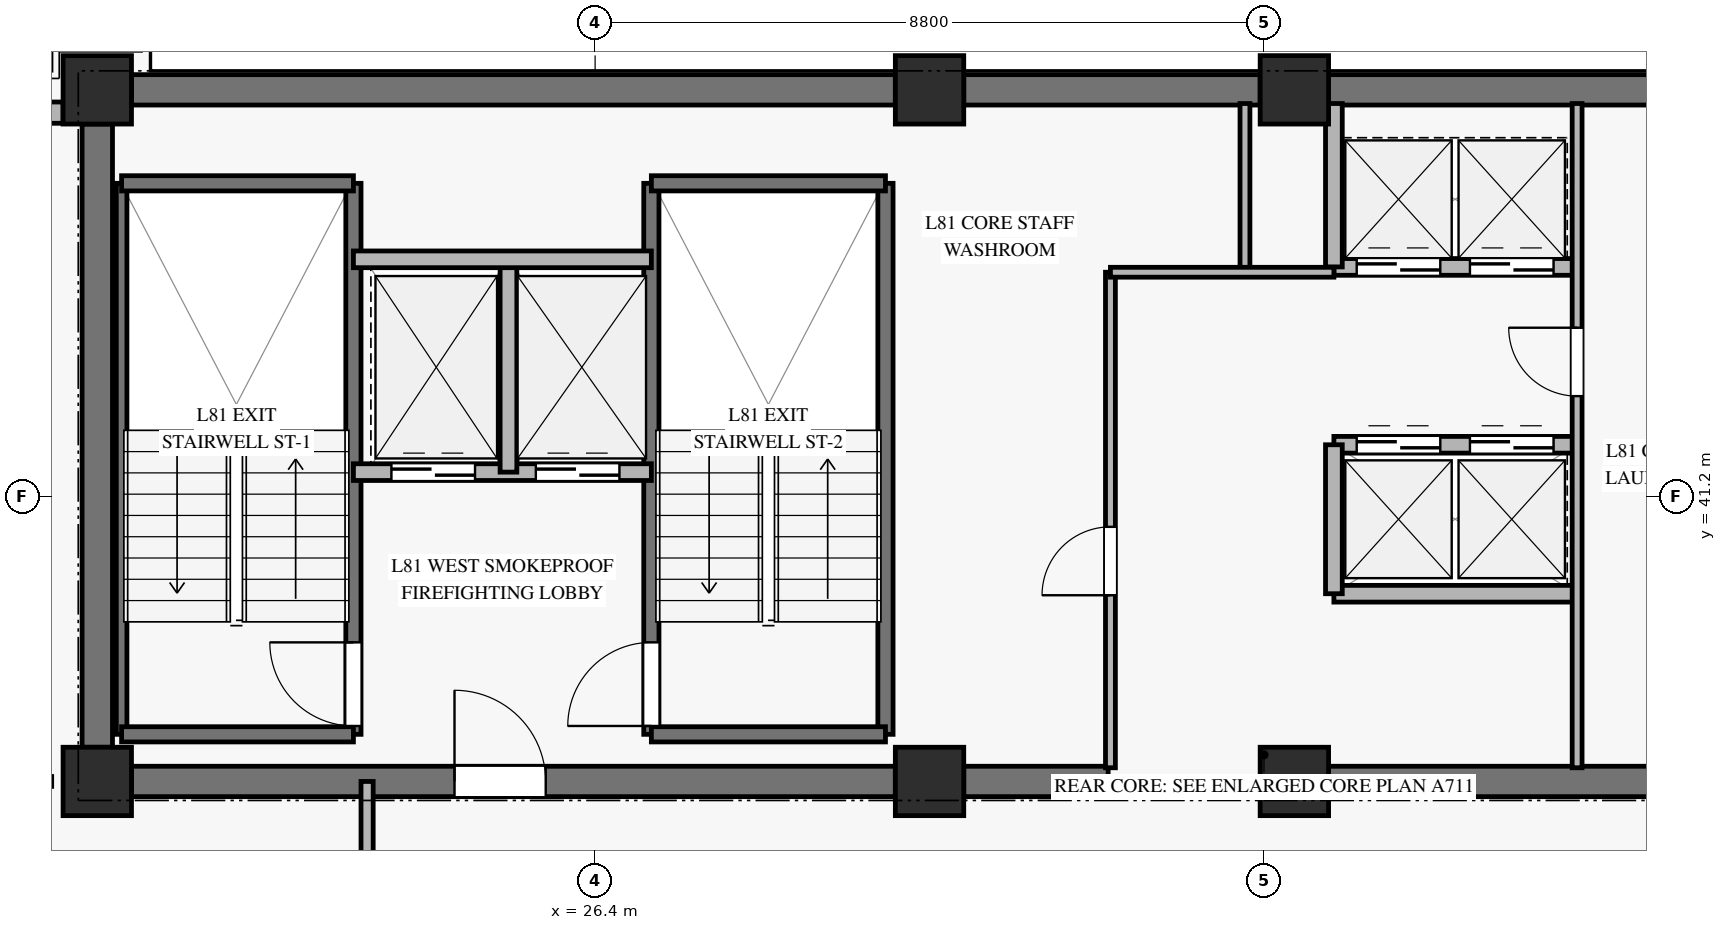
"""IFC4 building model, lengths in metres.
Left out: names, types, materials, properties, quantities, classifications, styles, units other than length and angle.
Written with IfcOpenShell. Run it as: python <this file> out.ifc"""

import sys

from ifc_helpers import new_model, si_unit, direction, frame, frame_2d, origin, origin_2d, place, context, subcontext, project, spatial, rectangle, extrude, source, transform, mapped, element, fill, save


model = new_model("IFC4")
c1 = context("Model", 3, precision=1e-05, world=origin(), true_north=direction((0.0, 1.0)))
c2 = subcontext(c1, "Body", "Model", "MODEL_VIEW")
j1 = project(units=[si_unit("LENGTHUNIT", "METRE"), si_unit("PLANEANGLEUNIT", "RADIAN")], contexts=[c1])
p1 = place(None, origin())
s1 = spatial("IfcSite", under=j1, at=p1, CompositionType="ELEMENT")
p2 = place(p1, origin())
s2 = spatial("IfcBuilding", under=s1, at=p2, CompositionType="ELEMENT")
p3 = place(p2, frame((0.0, 0.0, 314.2)))
s3 = spatial("IfcBuildingStorey", under=s2, at=p3, CompositionType="ELEMENT", Elevation=314.2)
m1 = source(origin(), c2, "Body", "SweptSolid", [
    extrude(rectangle(XDim=0.9, YDim=0.9, at=origin_2d()), origin(), (0.0, 0.0, 1.0), 3.185),
])
for number, where, z_axis, x_axis in (
    (1, (19.85, 37.45, 0.0), (0.0, 0.0, 1.0), (1.0, 0.0, 0.0)),
    (2, (19.85, 46.55, 0.0), (0.0, 0.0, 1.0), (1.0, 0.0, 0.0)),
    (3, (30.8, 37.45, 0.0), (0.0, 0.0, 1.0), (1.0, 0.0, 0.0)),
    (4, (30.8, 46.55, 0.0), (0.0, 0.0, 1.0), (1.0, 0.0, 0.0)),
    (5, (35.6, 37.45, 0.0), (0.0, 0.0, 1.0), (1.0, 0.0, 0.0)),
    (6, (35.6, 46.55, 0.0), (0.0, 0.0, 1.0), (1.0, 0.0, 0.0)),
):
    element("IfcColumn", number, at=place(p3, frame(where, z_axis=z_axis, x_axis=x_axis)), inside=s3, PredefinedType="PILASTER", context=c2, shape_type="MappedRepresentation", body=[
        mapped(m1, transform((0.0, 0.0, 0.0), x_axis=(1.0, 0.0, 0.0), y_axis=(0.0, 1.0, 0.0), z_axis=(0.0, 0.0, 1.0), scale=1.0)),
    ])
p4 = place(p3, frame((20.3, 46.55, 0.0), z_axis=(0.0, 0.0, 1.0), x_axis=(1.0, 0.0, 0.0)))
e7 = element("IfcWall", 7, at=p4, inside=s3, PredefinedType="SHEAR", context=c2, shape_type="SweptSolid", body=[
    extrude(rectangle(XDim=10.05, YDim=0.4, at=frame_2d((5.025, 0.0))), origin(), (0.0, 0.0, 1.0), 3.185),
])
p5 = place(p3, frame((31.25, 46.55, 0.0), z_axis=(0.0, 0.0, 1.0), x_axis=(1.0, 0.0, 0.0)))
e8 = element("IfcWall", 8, at=p5, inside=s3, PredefinedType="SHEAR", context=c2, shape_type="SweptSolid", body=[
    extrude(rectangle(XDim=3.9, YDim=0.4, at=frame_2d((1.95, 0.0))), origin(), (0.0, 0.0, 1.0), 3.185),
])
p6 = place(p3, frame((36.05, 46.55, 0.0), z_axis=(0.0, 0.0, 1.0), x_axis=(1.0, 0.0, 0.0)))
e9 = element("IfcWall", 9, at=p6, inside=s3, PredefinedType="SHEAR", context=c2, shape_type="SweptSolid", body=[
    extrude(rectangle(XDim=7.8, YDim=0.4, at=frame_2d((3.9, 0.0))), origin(), (0.0, 0.0, 1.0), 3.185),
])
p7 = place(p3, frame((20.3, 37.45, 0.0), z_axis=(0.0, 0.0, 1.0), x_axis=(1.0, 0.0, 0.0)))
e10 = element("IfcWall", 10, at=p7, inside=s3, PredefinedType="SHEAR", context=c2, shape_type="SweptSolid", body=[
    extrude(rectangle(XDim=10.05, YDim=0.4, at=frame_2d((5.025, 0.0))), origin(), (0.0, 0.0, 1.0), 3.185),
])
p8 = place(p7, frame((4.25, 0.0, 0.0)))
e11 = element("IfcOpeningElement", 11, at=p8, cuts=e10, PredefinedType="OPENING", context=c2, shape_type="SweptSolid", body=[
    extrude(rectangle(XDim=1.2, YDim=2.15, at=frame_2d((0.6, 1.075))), frame((0.0, 0.21, 0.0), z_axis=(0.0, -1.0, 0.0), x_axis=(1.0, 0.0, 0.0)), (0.0, 0.0, 1.0), 0.42),
])
p9 = place(p3, frame((31.25, 37.45, 0.0), z_axis=(0.0, 0.0, 1.0), x_axis=(1.0, 0.0, 0.0)))
e12 = element("IfcWall", 12, at=p9, inside=s3, PredefinedType="SHEAR", context=c2, shape_type="SweptSolid", body=[
    extrude(rectangle(XDim=1.9, YDim=0.4, at=frame_2d((0.95, 0.0))), origin(), (0.0, 0.0, 1.0), 3.185),
])
p10 = place(p3, frame((36.05, 37.45, 0.0), z_axis=(0.0, 0.0, 1.0), x_axis=(1.0, 0.0, 0.0)))
e13 = element("IfcWall", 13, at=p10, inside=s3, PredefinedType="SHEAR", context=c2, shape_type="SweptSolid", body=[
    extrude(rectangle(XDim=7.8, YDim=0.4, at=frame_2d((3.9, 0.0))), origin(), (0.0, 0.0, 1.0), 3.185),
])
p11 = place(p3, frame((19.85, 37.9, 0.0), z_axis=(0.0, 0.0, 1.0), x_axis=(0.0, 1.0, 0.0)))
e14 = element("IfcWall", 14, at=p11, inside=s3, PredefinedType="SHEAR", context=c2, shape_type="SweptSolid", body=[
    extrude(rectangle(XDim=8.2, YDim=0.4, at=frame_2d((4.1, 0.0))), origin(), (0.0, 0.0, 1.0), 3.185),
])
p12 = place(p3, frame((13.393, 46.25, 0.0), z_axis=(0.0, 0.0, 1.0), x_axis=(1.0, 0.0, 0.0)))
e15 = element("IfcWall", 15, at=p12, inside=s3, PredefinedType="SOLIDWALL", context=c2, shape_type="SweptSolid", body=[
    extrude(rectangle(XDim=6.007, YDim=0.28, at=frame_2d((3.003, 0.0))), origin(), (0.0, 0.0, 1.0), 2.815),
])
p13 = place(p12, frame((2.203, 0.0, 0.45)))
e16 = element("IfcOpeningElement", 16, at=p13, cuts=e15, PredefinedType="OPENING", context=c2, shape_type="SweptSolid", body=[
    extrude(rectangle(XDim=1.6, YDim=2.0, at=frame_2d((0.8, 1.0))), frame((0.0, 0.15, 0.0), z_axis=(0.0, -1.0, 0.0), x_axis=(1.0, 0.0, 0.0)), (0.0, 0.0, 1.0), 0.3),
])
p14 = place(p3, frame((20.17, 38.07, 0.0), z_axis=(0.0, 0.0, 1.0), x_axis=(0.0, 1.0, 0.0)))
e17 = element("IfcWall", 17, at=p14, inside=s3, PredefinedType="SOLIDWALL", context=c2, shape_type="SweptSolid", body=[
    extrude(rectangle(XDim=7.25, YDim=0.14, at=frame_2d((3.625, 0.0))), origin(), (0.0, 0.0, 1.0), 3.4),
])
p15 = place(p3, frame((23.22, 38.07, 0.0), z_axis=(0.0, 0.0, 1.0), x_axis=(0.0, 1.0, 0.0)))
e18 = element("IfcWall", 18, at=p15, inside=s3, PredefinedType="SOLIDWALL", context=c2, shape_type="SweptSolid", body=[
    extrude(rectangle(XDim=7.25, YDim=0.2, at=frame_2d((3.625, 0.0))), origin(), (0.0, 0.0, 1.0), 3.4),
])
p16 = place(p15, frame((0.11, 0.0, 0.0)))
e19 = element("IfcOpeningElement", 19, at=p16, cuts=e18, PredefinedType="OPENING", context=c2, shape_type="SweptSolid", body=[
    extrude(rectangle(XDim=1.1, YDim=2.15, at=frame_2d((0.55, 1.075))), frame((0.0, 0.11, 0.0), z_axis=(0.0, -1.0, 0.0), x_axis=(1.0, 0.0, 0.0)), (0.0, 0.0, 1.0), 0.22),
])
for number, where, z_axis, x_axis in (
    (20, (20.17, 45.32, 0.0), (0.0, 0.0, 1.0), (1.0, 0.0, 0.0)),
    (21, (20.17, 38.07, 0.0), (0.0, 0.0, 1.0), (1.0, 0.0, 0.0)),
):
    element("IfcWall", number, at=place(p3, frame(where, z_axis=z_axis, x_axis=x_axis)), inside=s3, PredefinedType="SOLIDWALL", context=c2, shape_type="SweptSolid", body=[
        extrude(rectangle(XDim=3.05, YDim=0.2, at=frame_2d((1.525, 0.0))), origin(), (0.0, 0.0, 1.0), 3.4),
    ])
p17 = place(p3, frame((27.14, 38.07, 0.0), z_axis=(0.0, 0.0, 1.0), x_axis=(0.0, 1.0, 0.0)))
e22 = element("IfcWall", 22, at=p17, inside=s3, PredefinedType="SOLIDWALL", context=c2, shape_type="SweptSolid", body=[
    extrude(rectangle(XDim=7.25, YDim=0.2, at=frame_2d((3.625, 0.0))), origin(), (0.0, 0.0, 1.0), 3.4),
])
p18 = place(p17, frame((0.11, 0.0, 0.0)))
e23 = element("IfcOpeningElement", 23, at=p18, cuts=e22, PredefinedType="OPENING", context=c2, shape_type="SweptSolid", body=[
    extrude(rectangle(XDim=1.1, YDim=2.15, at=frame_2d((0.55, 1.075))), frame((0.0, 0.11, 0.0), z_axis=(0.0, -1.0, 0.0), x_axis=(1.0, 0.0, 0.0)), (0.0, 0.0, 1.0), 0.22),
])
p19 = place(p3, frame((30.22, 38.07, 0.0), z_axis=(0.0, 0.0, 1.0), x_axis=(0.0, 1.0, 0.0)))
e24 = element("IfcWall", 24, at=p19, inside=s3, PredefinedType="SOLIDWALL", context=c2, shape_type="SweptSolid", body=[
    extrude(rectangle(XDim=7.25, YDim=0.2, at=frame_2d((3.625, 0.0))), origin(), (0.0, 0.0, 1.0), 3.4),
])
for number, where, z_axis, x_axis in (
    (25, (27.14, 45.32, 0.0), (0.0, 0.0, 1.0), (1.0, 0.0, 0.0)),
    (26, (27.14, 38.07, 0.0), (0.0, 0.0, 1.0), (1.0, 0.0, 0.0)),
):
    element("IfcWall", number, at=place(p3, frame(where, z_axis=z_axis, x_axis=x_axis)), inside=s3, PredefinedType="SOLIDWALL", context=c2, shape_type="SweptSolid", body=[
        extrude(rectangle(XDim=3.08, YDim=0.2, at=frame_2d((1.54, 0.0))), origin(), (0.0, 0.0, 1.0), 3.4),
    ])
p20 = place(p3, frame((23.22, 41.52, 0.0), z_axis=(0.0, 0.0, 1.0), x_axis=(1.0, 0.0, 0.0)))
e27 = element("IfcWall", 27, at=p20, inside=s3, PredefinedType="SOLIDWALL", context=c2, shape_type="SweptSolid", body=[
    extrude(rectangle(XDim=3.92, YDim=0.22, at=frame_2d((1.96, 0.0))), origin(), (0.0, 0.0, 1.0), 3.185),
])
p21 = place(p20, frame((0.5, 0.0, 0.0)))
e28 = element("IfcOpeningElement", 28, at=p21, cuts=e27, PredefinedType="OPENING", context=c2, shape_type="SweptSolid", body=[
    extrude(rectangle(XDim=1.1, YDim=2.2, at=frame_2d((0.55, 1.1))), frame((0.0, 0.12, 0.0), z_axis=(0.0, -1.0, 0.0), x_axis=(1.0, 0.0, 0.0)), (0.0, 0.0, 1.0), 0.24),
])
p22 = place(p20, frame((2.4, 0.0, 0.0)))
e29 = element("IfcOpeningElement", 29, at=p22, cuts=e27, PredefinedType="OPENING", context=c2, shape_type="SweptSolid", body=[
    extrude(rectangle(XDim=1.1, YDim=2.2, at=frame_2d((0.55, 1.1))), frame((0.0, 0.12, 0.0), z_axis=(0.0, -1.0, 0.0), x_axis=(1.0, 0.0, 0.0)), (0.0, 0.0, 1.0), 0.24),
])
p23 = place(p3, frame((25.26, 41.52, 0.0), z_axis=(0.0, 0.0, 1.0), x_axis=(0.0, 1.0, 0.0)))
e30 = element("IfcWall", 30, at=p23, inside=s3, PredefinedType="SOLIDWALL", context=c2, shape_type="SweptSolid", body=[
    extrude(rectangle(XDim=2.8, YDim=0.22, at=frame_2d((1.4, 0.0))), origin(), (0.0, 0.0, 1.0), 3.185),
])
p24 = place(p3, frame((23.22, 44.32, 0.0), z_axis=(0.0, 0.0, 1.0), x_axis=(1.0, 0.0, 0.0)))
e31 = element("IfcWall", 31, at=p24, inside=s3, PredefinedType="SOLIDWALL", context=c2, shape_type="SweptSolid", body=[
    extrude(rectangle(XDim=3.92, YDim=0.22, at=frame_2d((1.96, 0.0))), origin(), (0.0, 0.0, 1.0), 3.185),
])
p25 = place(p3, frame((36.12, 44.22, 0.0), z_axis=(0.0, 0.0, 1.0), x_axis=(1.0, 0.0, 0.0)))
e32 = element("IfcWall", 32, at=p25, inside=s3, PredefinedType="SOLIDWALL", context=c2, shape_type="SweptSolid", body=[
    extrude(rectangle(XDim=3.2, YDim=0.22, at=frame_2d((1.6, 0.0))), origin(), (0.0, 0.0, 1.0), 3.185),
])
p26 = place(p25, frame((0.3, 0.0, 0.0)))
e33 = element("IfcOpeningElement", 33, at=p26, cuts=e32, PredefinedType="OPENING", context=c2, shape_type="SweptSolid", body=[
    extrude(rectangle(XDim=1.1, YDim=2.2, at=frame_2d((0.55, 1.1))), frame((0.0, 0.12, 0.0), z_axis=(0.0, -1.0, 0.0), x_axis=(1.0, 0.0, 0.0)), (0.0, 0.0, 1.0), 0.24),
])
p27 = place(p25, frame((1.79, 0.0, 0.0)))
e34 = element("IfcOpeningElement", 34, at=p27, cuts=e32, PredefinedType="OPENING", context=c2, shape_type="SweptSolid", body=[
    extrude(rectangle(XDim=1.1, YDim=2.2, at=frame_2d((0.55, 1.1))), frame((0.0, 0.12, 0.0), z_axis=(0.0, -1.0, 0.0), x_axis=(1.0, 0.0, 0.0)), (0.0, 0.0, 1.0), 0.24),
])
p28 = place(p3, frame((36.12, 41.88, 0.0), z_axis=(0.0, 0.0, 1.0), x_axis=(1.0, 0.0, 0.0)))
e35 = element("IfcWall", 35, at=p28, inside=s3, PredefinedType="SOLIDWALL", context=c2, shape_type="SweptSolid", body=[
    extrude(rectangle(XDim=3.2, YDim=0.22, at=frame_2d((1.6, 0.0))), origin(), (0.0, 0.0, 1.0), 3.185),
])
p29 = place(p28, frame((0.3, 0.0, 0.0)))
e36 = element("IfcOpeningElement", 36, at=p29, cuts=e35, PredefinedType="OPENING", context=c2, shape_type="SweptSolid", body=[
    extrude(rectangle(XDim=1.1, YDim=2.2, at=frame_2d((0.55, 1.1))), frame((0.0, 0.12, 0.0), z_axis=(0.0, -1.0, 0.0), x_axis=(1.0, 0.0, 0.0)), (0.0, 0.0, 1.0), 0.24),
])
p30 = place(p28, frame((1.79, 0.0, 0.0)))
e37 = element("IfcOpeningElement", 37, at=p30, cuts=e35, PredefinedType="OPENING", context=c2, shape_type="SweptSolid", body=[
    extrude(rectangle(XDim=1.1, YDim=2.2, at=frame_2d((0.55, 1.1))), frame((0.0, 0.12, 0.0), z_axis=(0.0, -1.0, 0.0), x_axis=(1.0, 0.0, 0.0)), (0.0, 0.0, 1.0), 0.24),
])
p31 = place(p3, frame((36.12, 39.92, 0.0), z_axis=(0.0, 0.0, 1.0), x_axis=(1.0, 0.0, 0.0)))
e38 = element("IfcWall", 38, at=p31, inside=s3, PredefinedType="SOLIDWALL", context=c2, shape_type="SweptSolid", body=[
    extrude(rectangle(XDim=3.2, YDim=0.22, at=frame_2d((1.6, 0.0))), origin(), (0.0, 0.0, 1.0), 3.185),
])
p32 = place(p3, frame((36.12, 39.92, 0.0), z_axis=(0.0, 0.0, 1.0), x_axis=(0.0, 1.0, 0.0)))
e39 = element("IfcWall", 39, at=p32, inside=s3, PredefinedType="SOLIDWALL", context=c2, shape_type="SweptSolid", body=[
    extrude(rectangle(XDim=1.96, YDim=0.22, at=frame_2d((0.98, 0.0))), origin(), (0.0, 0.0, 1.0), 3.185),
])
p33 = place(p3, frame((36.12, 44.22, 0.0), z_axis=(0.0, 0.0, 1.0), x_axis=(0.0, 1.0, 0.0)))
e40 = element("IfcWall", 40, at=p33, inside=s3, PredefinedType="SOLIDWALL", context=c2, shape_type="SweptSolid", body=[
    extrude(rectangle(XDim=2.15, YDim=0.22, at=frame_2d((1.075, 0.0))), origin(), (0.0, 0.0, 1.0), 3.185),
])
p34 = place(p3, frame((33.18, 37.63, 0.0), z_axis=(0.0, 0.0, 1.0), x_axis=(0.0, 1.0, 0.0)))
e41 = element("IfcWall", 41, at=p34, inside=s3, PredefinedType="PARTITIONING", context=c2, shape_type="SweptSolid", body=[
    extrude(rectangle(XDim=6.52, YDim=0.13, at=frame_2d((3.26, 0.0))), origin(), (0.0, 0.0, 1.0), 2.27),
])
p35 = place(p34, frame((2.27, 0.0, 0.0)))
e42 = element("IfcOpeningElement", 42, at=p35, cuts=e41, PredefinedType="OPENING", context=c2, shape_type="SweptSolid", body=[
    extrude(rectangle(XDim=0.9, YDim=2.1, at=frame_2d((0.45, 1.05))), frame((0.0, 0.075, 0.0), z_axis=(0.0, -1.0, 0.0), x_axis=(1.0, 0.0, 0.0)), (0.0, 0.0, 1.0), 0.15),
])
p36 = place(p3, frame((34.95, 44.15, 0.0), z_axis=(0.0, 0.0, 1.0), x_axis=(0.0, 1.0, 0.0)))
e43 = element("IfcWall", 43, at=p36, inside=s3, PredefinedType="PARTITIONING", context=c2, shape_type="SweptSolid", body=[
    extrude(rectangle(XDim=2.22, YDim=0.13, at=frame_2d((1.11, 0.0))), origin(), (0.0, 0.0, 1.0), 3.185),
])
p37 = place(p3, frame((33.18, 44.15, 0.0), z_axis=(0.0, 0.0, 1.0), x_axis=(1.0, 0.0, 0.0)))
e44 = element("IfcWall", 44, at=p37, inside=s3, PredefinedType="PARTITIONING", context=c2, shape_type="SweptSolid", body=[
    extrude(rectangle(XDim=2.94, YDim=0.13, at=frame_2d((1.47, 0.0))), origin(), (0.0, 0.0, 1.0), 2.47),
])
p38 = place(p3, frame((39.32, 37.63, 0.0), z_axis=(0.0, 0.0, 1.0), x_axis=(0.0, 1.0, 0.0)))
e45 = element("IfcWall", 45, at=p38, inside=s3, PredefinedType="PARTITIONING", context=c2, shape_type="SweptSolid", body=[
    extrude(rectangle(XDim=8.74, YDim=0.13, at=frame_2d((4.37, 0.0))), origin(), (0.0, 0.0, 1.0), 3.185),
])
p39 = place(p38, frame((4.89, 0.0, 0.0)))
e46 = element("IfcOpeningElement", 46, at=p39, cuts=e45, PredefinedType="OPENING", context=c2, shape_type="SweptSolid", body=[
    extrude(rectangle(XDim=0.9, YDim=2.1, at=frame_2d((0.45, 1.05))), frame((0.0, 0.075, 0.0), z_axis=(0.0, -1.0, 0.0), x_axis=(1.0, 0.0, 0.0)), (0.0, 0.0, 1.0), 0.15),
])
p40 = place(p3, frame((23.4, 20.704, 0.0), z_axis=(0.0, 0.0, 1.0), x_axis=(0.0, 1.0, 0.0)))
e47 = element("IfcWall", 47, at=p40, inside=s3, PredefinedType="PARTITIONING", context=c2, shape_type="SweptSolid", body=[
    extrude(rectangle(XDim=16.746, YDim=0.16, at=frame_2d((8.373, 0.0))), origin(), (0.0, 0.0, 1.0), 2.77),
])
p41 = place(p40, frame((13.766, 0.0, 0.0)))
e48 = element("IfcOpeningElement", 48, at=p41, cuts=e47, PredefinedType="OPENING", context=c2, shape_type="SweptSolid", body=[
    extrude(rectangle(XDim=1.05, YDim=2.15, at=frame_2d((0.525, 1.075))), frame((0.0, 0.09, 0.0), z_axis=(0.0, -1.0, 0.0), x_axis=(1.0, 0.0, 0.0)), (0.0, 0.0, 1.0), 0.18),
])
m2 = source(origin(), c2, "Body", "SweptSolid", [
    extrude(rectangle(XDim=1.1, YDim=2.15, at=frame_2d((0.55, 1.075))), frame((0.0, 0.025, 0.0), z_axis=(0.0, -1.0, 0.0), x_axis=(1.0, 0.0, 0.0)), (0.0, 0.0, 1.0), 0.05),
])
p42 = place(p16, origin())
e49 = element("IfcDoor", 49, at=p42, inside=s3, OperationType="SINGLE_SWING_RIGHT", PredefinedType="DOOR", context=c2, shape_type="MappedRepresentation", body=[
    mapped(m2, transform((0.0, 0.0, 0.0), x_axis=(1.0, 0.0, 0.0), y_axis=(0.0, 1.0, 0.0), z_axis=(0.0, 0.0, 1.0), scale=1.0)),
])
fill(e19, e49)
p43 = place(p18, origin())
e50 = element("IfcDoor", 50, at=p43, inside=s3, OperationType="SINGLE_SWING_LEFT", PredefinedType="DOOR", context=c2, shape_type="MappedRepresentation", body=[
    mapped(m2, transform((0.0, 0.0, 0.0), x_axis=(1.0, 0.0, 0.0), y_axis=(0.0, 1.0, 0.0), z_axis=(0.0, 0.0, 1.0), scale=1.0)),
])
fill(e23, e50)
m3 = source(origin(), c2, "Body", "SweptSolid", [
    extrude(rectangle(XDim=1.1, YDim=2.2, at=frame_2d((0.55, 1.1))), frame((0.0, 0.025, 0.0), z_axis=(0.0, -1.0, 0.0), x_axis=(1.0, 0.0, 0.0)), (0.0, 0.0, 1.0), 0.05),
])
p44 = place(p21, origin())
e51 = element("IfcDoor", 51, at=p44, inside=s3, OperationType="SLIDING_TO_LEFT", PredefinedType="DOOR", context=c2, shape_type="MappedRepresentation", body=[
    mapped(m3, transform((0.0, 0.0, 0.0), x_axis=(1.0, 0.0, 0.0), y_axis=(0.0, 1.0, 0.0), z_axis=(0.0, 0.0, 1.0), scale=1.0)),
])
fill(e28, e51)
p45 = place(p22, origin())
e52 = element("IfcDoor", 52, at=p45, inside=s3, OperationType="SLIDING_TO_LEFT", PredefinedType="DOOR", context=c2, shape_type="MappedRepresentation", body=[
    mapped(m3, transform((0.0, 0.0, 0.0), x_axis=(1.0, 0.0, 0.0), y_axis=(0.0, 1.0, 0.0), z_axis=(0.0, 0.0, 1.0), scale=1.0)),
])
fill(e29, e52)
m4 = source(origin(), c2, "Body", "SweptSolid", [
    extrude(rectangle(XDim=1.2, YDim=2.15, at=frame_2d((0.6, 1.075))), frame((0.0, 0.025, 0.0), z_axis=(0.0, -1.0, 0.0), x_axis=(1.0, 0.0, 0.0)), (0.0, 0.0, 1.0), 0.05),
])
p46 = place(p8, origin())
e53 = element("IfcDoor", 53, at=p46, inside=s3, OperationType="SINGLE_SWING_LEFT", PredefinedType="DOOR", context=c2, shape_type="MappedRepresentation", body=[
    mapped(m4, transform((0.0, 0.0, 0.0), x_axis=(1.0, 0.0, 0.0), y_axis=(0.0, 1.0, 0.0), z_axis=(0.0, 0.0, 1.0), scale=1.0)),
])
fill(e11, e53)
p47 = place(p26, origin())
e54 = element("IfcDoor", 54, at=p47, inside=s3, OperationType="SLIDING_TO_LEFT", PredefinedType="DOOR", context=c2, shape_type="MappedRepresentation", body=[
    mapped(m3, transform((0.0, 0.0, 0.0), x_axis=(1.0, 0.0, 0.0), y_axis=(0.0, 1.0, 0.0), z_axis=(0.0, 0.0, 1.0), scale=1.0)),
])
fill(e33, e54)
p48 = place(p27, origin())
e55 = element("IfcDoor", 55, at=p48, inside=s3, OperationType="SLIDING_TO_LEFT", PredefinedType="DOOR", context=c2, shape_type="MappedRepresentation", body=[
    mapped(m3, transform((0.0, 0.0, 0.0), x_axis=(1.0, 0.0, 0.0), y_axis=(0.0, 1.0, 0.0), z_axis=(0.0, 0.0, 1.0), scale=1.0)),
])
fill(e34, e55)
p49 = place(p29, origin())
e56 = element("IfcDoor", 56, at=p49, inside=s3, OperationType="SLIDING_TO_LEFT", PredefinedType="DOOR", context=c2, shape_type="MappedRepresentation", body=[
    mapped(m3, transform((0.0, 0.0, 0.0), x_axis=(1.0, 0.0, 0.0), y_axis=(0.0, 1.0, 0.0), z_axis=(0.0, 0.0, 1.0), scale=1.0)),
])
fill(e36, e56)
p50 = place(p30, origin())
e57 = element("IfcDoor", 57, at=p50, inside=s3, OperationType="SLIDING_TO_LEFT", PredefinedType="DOOR", context=c2, shape_type="MappedRepresentation", body=[
    mapped(m3, transform((0.0, 0.0, 0.0), x_axis=(1.0, 0.0, 0.0), y_axis=(0.0, 1.0, 0.0), z_axis=(0.0, 0.0, 1.0), scale=1.0)),
])
fill(e37, e57)
m5 = source(origin(), c2, "Body", "SweptSolid", [
    extrude(rectangle(XDim=0.9, YDim=2.1, at=frame_2d((0.45, 1.05))), frame((0.0, 0.025, 0.0), z_axis=(0.0, -1.0, 0.0), x_axis=(1.0, 0.0, 0.0)), (0.0, 0.0, 1.0), 0.05),
])
p51 = place(p35, origin())
e58 = element("IfcDoor", 58, at=p51, inside=s3, OperationType="SINGLE_SWING_LEFT", PredefinedType="DOOR", context=c2, shape_type="MappedRepresentation", body=[
    mapped(m5, transform((0.0, 0.0, 0.0), x_axis=(1.0, 0.0, 0.0), y_axis=(0.0, 1.0, 0.0), z_axis=(0.0, 0.0, 1.0), scale=1.0)),
])
fill(e42, e58)
p52 = place(p39, origin())
e59 = element("IfcDoor", 59, at=p52, inside=s3, OperationType="SINGLE_SWING_RIGHT", PredefinedType="DOOR", context=c2, shape_type="MappedRepresentation", body=[
    mapped(m5, transform((0.0, 0.0, 0.0), x_axis=(1.0, 0.0, 0.0), y_axis=(0.0, 1.0, 0.0), z_axis=(0.0, 0.0, 1.0), scale=1.0)),
])
fill(e46, e59)
save(model, sys.argv[1])
